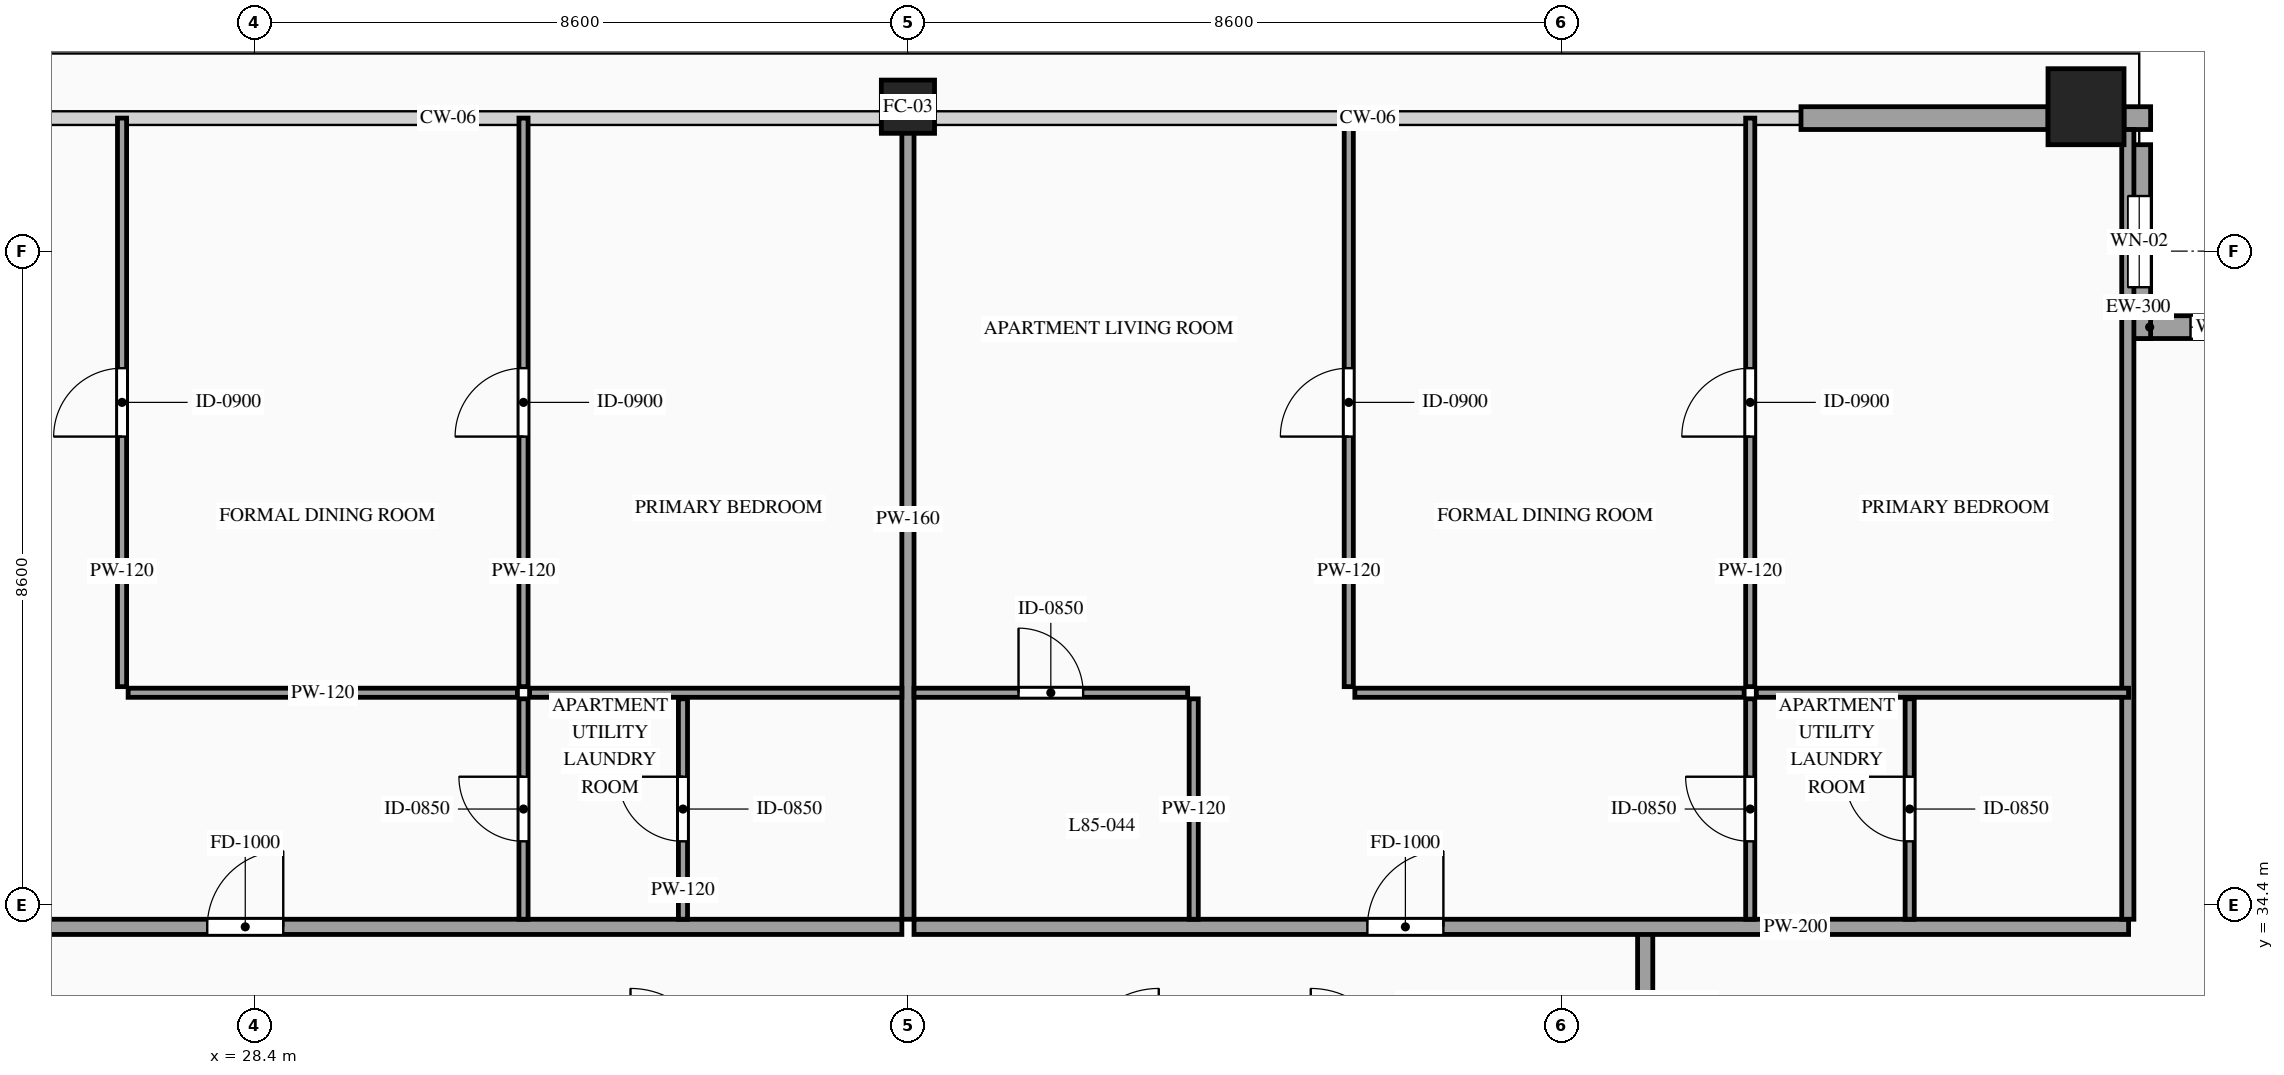
"""IFC4 building model, lengths in metres.
Left out: names, types, materials, properties, quantities, classifications, styles, units other than length and angle.
Written with IfcOpenShell. Run it as: python <this file> out.ifc"""

import sys

from ifc_helpers import new_model, si_unit, direction, frame, frame_2d, origin, origin_2d, place, context, subcontext, project, spatial, rectangle, hollow_rectangle, extrude, source, transform, mapped, element, fill, save


model = new_model("IFC4")
c1 = context("Model", 3, precision=1e-05, world=origin(), true_north=direction((0.0, 1.0)))
c2 = subcontext(c1, "Body", "Model", "MODEL_VIEW")
j1 = project(units=[si_unit("LENGTHUNIT", "METRE"), si_unit("PLANEANGLEUNIT", "RADIAN")], contexts=[c1])
p1 = place(None, origin())
s1 = spatial("IfcSite", under=j1, at=p1, CompositionType="ELEMENT")
p2 = place(p1, origin())
s2 = spatial("IfcBuilding", under=s1, at=p2, CompositionType="ELEMENT")
p3 = place(p2, frame((0.0, 0.0, 318.2)))
s3 = spatial("IfcBuildingStorey", under=s2, at=p3, CompositionType="ELEMENT", Elevation=318.2)
m1 = source(origin(), c2, "Body", "SweptSolid", [
    extrude(hollow_rectangle(XDim=0.7, YDim=0.7, WallThickness=0.032, at=origin_2d()), origin(), (0.0, 0.0, 1.0), 3.5),
])
p4 = place(p3, frame((37.0, 44.9, 0.0), z_axis=(0.0, 0.0, 1.0), x_axis=(1.0, 0.0, 0.0)))
e1 = element("IfcColumn", 1, at=p4, inside=s3, PredefinedType="COLUMN", context=c2, shape_type="MappedRepresentation", body=[
    mapped(m1, transform((0.0, 0.0, 0.0), scale=1.0)),
])
m2 = source(origin(), c2, "Body", "SweptSolid", [
    extrude(hollow_rectangle(XDim=1.0, YDim=1.0, WallThickness=0.048, at=origin_2d()), origin(), (0.0, 0.0, 1.0), 3.5),
])
p5 = place(p3, frame((52.5, 44.9, 0.0), z_axis=(0.0, 0.0, 1.0), x_axis=(1.0, 0.0, 0.0)))
e2 = element("IfcColumn", 2, at=p5, inside=s3, PredefinedType="COLUMN", context=c2, shape_type="MappedRepresentation", body=[
    mapped(m2, transform((0.0, 0.0, 0.0), scale=1.0)),
])
p6 = place(p3, frame((55.6, 42.0, 0.0), z_axis=(0.0, 0.0, 1.0), x_axis=(-1.0, 0.0, 0.0)))
e3 = element("IfcWall", 3, at=p6, inside=s3, PredefinedType="SOLIDWALL", context=c2, shape_type="SweptSolid", body=[
    extrude(rectangle(XDim=2.55, YDim=0.3, at=frame_2d((1.275, 0.0))), origin(), (0.0, 0.0, 1.0), 3.28),
])
p7 = place(p6, frame((0.825, 0.0, 0.85)))
e4 = element("IfcOpeningElement", 4, at=p7, cuts=e3, PredefinedType="OPENING", context=c2, shape_type="SweptSolid", body=[
    extrude(rectangle(XDim=0.9, YDim=1.5, at=frame_2d((0.45, 0.75))), frame((0.0, 0.165, 0.0), z_axis=(0.0, -1.0, 0.0), x_axis=(1.0, 0.0, 0.0)), (0.0, 0.0, 1.0), 0.33),
])
p8 = place(p3, frame((53.2, 41.85, 0.0), z_axis=(0.0, 0.0, 1.0), x_axis=(0.0, 1.0, 0.0)))
e5 = element("IfcWall", 5, at=p8, inside=s3, PredefinedType="SOLIDWALL", context=c2, shape_type="SweptSolid", body=[
    extrude(rectangle(XDim=2.55, YDim=0.3, at=frame_2d((1.275, 0.0))), origin(), (0.0, 0.0, 1.0), 3.28),
])
p9 = place(p8, frame((0.675, 0.0, 0.85)))
e6 = element("IfcOpeningElement", 6, at=p9, cuts=e5, PredefinedType="OPENING", context=c2, shape_type="SweptSolid", body=[
    extrude(rectangle(XDim=1.2, YDim=2.1, at=frame_2d((0.6, 1.05))), frame((0.0, 0.165, 0.0), z_axis=(0.0, -1.0, 0.0), x_axis=(1.0, 0.0, 0.0)), (0.0, 0.0, 1.0), 0.33),
])
m3 = source(origin(), c2, "Body", "SweptSolid", [
    extrude(rectangle(XDim=0.35, YDim=0.3, at=frame_2d((0.175, 0.0))), origin(), (0.0, 0.0, 1.0), 3.28),
])
p10 = place(p3, frame((53.0, 44.75, 0.0), z_axis=(0.0, 0.0, 1.0), x_axis=(1.0, 0.0, 0.0)))
e7 = element("IfcWall", 7, at=p10, inside=s3, PredefinedType="SOLIDWALL", context=c2, shape_type="MappedRepresentation", body=[
    mapped(m3, transform((0.0, 0.0, 0.0), scale=1.0)),
])
m4 = source(origin(), c2, "Body", "SweptSolid", [
    extrude(rectangle(XDim=3.25, YDim=0.3, at=frame_2d((1.625, 0.0))), origin(), (0.0, 0.0, 1.0), 2.885),
])
p11 = place(p3, frame((48.75, 44.75, 0.0), z_axis=(0.0, 0.0, 1.0), x_axis=(1.0, 0.0, 0.0)))
e8 = element("IfcWall", 8, at=p11, inside=s3, PredefinedType="SOLIDWALL", context=c2, shape_type="MappedRepresentation", body=[
    mapped(m4, transform((0.0, 0.0, 0.0), scale=1.0)),
])
m5 = source(origin(), c2, "Body", "SweptSolid", [
    extrude(rectangle(XDim=1.7, YDim=0.2, at=frame_2d((0.85, 0.0))), origin(), (0.0, 0.0, 1.0), 3.28),
])
p12 = place(p3, frame((46.7, 32.35, 0.0), z_axis=(0.0, 0.0, 1.0), x_axis=(0.0, 1.0, 0.0)))
e9 = element("IfcWall", 9, at=p12, inside=s3, PredefinedType="PARTITIONING", context=c2, shape_type="MappedRepresentation", body=[
    mapped(m5, transform((0.0, 0.0, 0.0), scale=1.0)),
])
p13 = place(p3, frame((20.94, 34.11, 0.0), z_axis=(0.0, 0.0, 1.0), x_axis=(1.0, 0.0, 0.0)))
e10 = element("IfcWall", 10, at=p13, inside=s3, PredefinedType="PARTITIONING", context=c2, shape_type="SweptSolid", body=[
    extrude(rectangle(XDim=15.98, YDim=0.2, at=frame_2d((7.99, 0.0))), origin(), (0.0, 0.0, 1.0), 3.28),
])
p14 = place(p13, frame((6.841, 0.0, 0.0)))
e11 = element("IfcOpeningElement", 11, at=p14, cuts=e10, PredefinedType="OPENING", context=c2, shape_type="SweptSolid", body=[
    extrude(rectangle(XDim=1.0, YDim=2.2, at=frame_2d((0.5, 1.1))), frame((0.0, 0.115, 0.0), z_axis=(0.0, -1.0, 0.0), x_axis=(1.0, 0.0, 0.0)), (0.0, 0.0, 1.0), 0.23),
])
m6 = source(origin(), c2, "Body", "SweptSolid", [
    extrude(rectangle(XDim=10.54, YDim=0.16, at=frame_2d((5.27, 0.0))), origin(), (0.0, 0.0, 1.0), 2.787),
])
p15 = place(p3, frame((37.0, 34.21, 0.0), z_axis=(0.0, 0.0, 1.0), x_axis=(0.0, 1.0, 0.0)))
e12 = element("IfcWall", 12, at=p15, inside=s3, PredefinedType="PARTITIONING", context=c2, shape_type="MappedRepresentation", body=[
    mapped(m6, transform((0.0, 0.0, 0.0), scale=1.0)),
])
p16 = place(p3, frame((34.04, 34.21, 0.0), z_axis=(0.0, 0.0, 1.0), x_axis=(0.0, 1.0, 0.0)))
e13 = element("IfcWall", 13, at=p16, inside=s3, PredefinedType="PARTITIONING", context=c2, shape_type="SweptSolid", body=[
    extrude(rectangle(XDim=2.9, YDim=0.12, at=frame_2d((1.45, 0.0))), origin(), (0.0, 0.0, 1.0), 3.28),
])
p17 = place(p16, frame((1.025, 0.0, 0.0)))
e14 = element("IfcOpeningElement", 14, at=p17, cuts=e13, PredefinedType="OPENING", context=c2, shape_type="SweptSolid", body=[
    extrude(rectangle(XDim=0.85, YDim=2.1, at=frame_2d((0.425, 1.05))), frame((0.0, 0.075, 0.0), z_axis=(0.0, -1.0, 0.0), x_axis=(1.0, 0.0, 0.0)), (0.0, 0.0, 1.0), 0.15),
])
m7 = source(origin(), c2, "Body", "SweptSolid", [
    extrude(rectangle(XDim=4.898, YDim=0.12, at=frame_2d((2.449, 0.0))), origin(), (0.0, 0.0, 1.0), 3.28),
])
p18 = place(p3, frame((32.022, 37.19, 0.0), z_axis=(0.0, 0.0, 1.0), x_axis=(1.0, 0.0, 0.0)))
e15 = element("IfcWall", 15, at=p18, inside=s3, PredefinedType="PARTITIONING", context=c2, shape_type="MappedRepresentation", body=[
    mapped(m7, transform((0.0, 0.0, 0.0), scale=1.0)),
])
p19 = place(p3, frame((31.942, 37.27, 0.0), z_axis=(0.0, 0.0, 1.0), x_axis=(0.0, 1.0, 0.0)))
e16 = element("IfcWall", 16, at=p19, inside=s3, PredefinedType="PARTITIONING", context=c2, shape_type="SweptSolid", body=[
    extrude(rectangle(XDim=7.48, YDim=0.12, at=frame_2d((3.74, 0.0))), origin(), (0.0, 0.0, 1.0), 3.28),
])
p20 = place(p19, frame((3.29, 0.0, 0.0)))
e17 = element("IfcOpeningElement", 17, at=p20, cuts=e16, PredefinedType="OPENING", context=c2, shape_type="SweptSolid", body=[
    extrude(rectangle(XDim=0.9, YDim=2.15, at=frame_2d((0.45, 1.075))), frame((0.0, 0.075, 0.0), z_axis=(0.0, -1.0, 0.0), x_axis=(1.0, 0.0, 0.0)), (0.0, 0.0, 1.0), 0.15),
])
p21 = place(p3, frame((31.942, 34.21, 0.0), z_axis=(0.0, 0.0, 1.0), x_axis=(0.0, 1.0, 0.0)))
e18 = element("IfcWall", 18, at=p21, inside=s3, PredefinedType="PARTITIONING", context=c2, shape_type="SweptSolid", body=[
    extrude(rectangle(XDim=2.9, YDim=0.12, at=frame_2d((1.45, 0.0))), origin(), (0.0, 0.0, 1.0), 3.28),
])
p22 = place(p21, frame((1.025, 0.0, 0.0)))
e19 = element("IfcOpeningElement", 19, at=p22, cuts=e18, PredefinedType="OPENING", context=c2, shape_type="SweptSolid", body=[
    extrude(rectangle(XDim=0.85, YDim=2.1, at=frame_2d((0.425, 1.05))), frame((0.0, 0.075, 0.0), z_axis=(0.0, -1.0, 0.0), x_axis=(1.0, 0.0, 0.0)), (0.0, 0.0, 1.0), 0.15),
])
m8 = source(origin(), c2, "Body", "SweptSolid", [
    extrude(rectangle(XDim=5.122, YDim=0.12, at=frame_2d((2.561, 0.0))), origin(), (0.0, 0.0, 1.0), 3.28),
])
p23 = place(p3, frame((26.74, 37.19, 0.0), z_axis=(0.0, 0.0, 1.0), x_axis=(1.0, 0.0, 0.0)))
e20 = element("IfcWall", 20, at=p23, inside=s3, PredefinedType="PARTITIONING", context=c2, shape_type="MappedRepresentation", body=[
    mapped(m8, transform((0.0, 0.0, 0.0), scale=1.0)),
])
p24 = place(p3, frame((26.66, 37.27, 0.0), z_axis=(0.0, 0.0, 1.0), x_axis=(0.0, 1.0, 0.0)))
e21 = element("IfcWall", 21, at=p24, inside=s3, PredefinedType="PARTITIONING", context=c2, shape_type="SweptSolid", body=[
    extrude(rectangle(XDim=7.48, YDim=0.12, at=frame_2d((3.74, 0.0))), origin(), (0.0, 0.0, 1.0), 3.28),
])
p25 = place(p24, frame((3.29, 0.0, 0.0)))
e22 = element("IfcOpeningElement", 22, at=p25, cuts=e21, PredefinedType="OPENING", context=c2, shape_type="SweptSolid", body=[
    extrude(rectangle(XDim=0.9, YDim=2.15, at=frame_2d((0.45, 1.075))), frame((0.0, 0.075, 0.0), z_axis=(0.0, -1.0, 0.0), x_axis=(1.0, 0.0, 0.0)), (0.0, 0.0, 1.0), 0.15),
])
p26 = place(p3, frame((37.08, 34.11, 0.0), z_axis=(0.0, 0.0, 1.0), x_axis=(1.0, 0.0, 0.0)))
e23 = element("IfcWall", 23, at=p26, inside=s3, PredefinedType="PARTITIONING", context=c2, shape_type="SweptSolid", body=[
    extrude(rectangle(XDim=15.98, YDim=0.2, at=frame_2d((7.99, 0.0))), origin(), (0.0, 0.0, 1.0), 3.28),
])
p27 = place(p26, frame((5.965, 0.0, 0.0)))
e24 = element("IfcOpeningElement", 24, at=p27, cuts=e23, PredefinedType="OPENING", context=c2, shape_type="SweptSolid", body=[
    extrude(rectangle(XDim=1.0, YDim=2.2, at=frame_2d((0.5, 1.1))), frame((0.0, 0.115, 0.0), z_axis=(0.0, -1.0, 0.0), x_axis=(1.0, 0.0, 0.0)), (0.0, 0.0, 1.0), 0.23),
])
m9 = source(origin(), c2, "Body", "SweptSolid", [
    extrude(rectangle(XDim=10.39, YDim=0.16, at=frame_2d((5.195, 0.0))), origin(), (0.0, 0.0, 1.0), 3.28),
])
p28 = place(p3, frame((53.05, 34.21, 0.0), z_axis=(0.0, 0.0, 1.0), x_axis=(0.0, 1.0, 0.0)))
e25 = element("IfcWall", 25, at=p28, inside=s3, PredefinedType="PARTITIONING", context=c2, shape_type="MappedRepresentation", body=[
    mapped(m9, transform((0.0, 0.0, 0.0), scale=1.0)),
])
p29 = place(p3, frame((37.08, 37.19, 0.0), z_axis=(0.0, 0.0, 1.0), x_axis=(1.0, 0.0, 0.0)))
e26 = element("IfcWall", 26, at=p29, inside=s3, PredefinedType="PARTITIONING", context=c2, shape_type="SweptSolid", body=[
    extrude(rectangle(XDim=3.6, YDim=0.12, at=frame_2d((1.8, 0.0))), origin(), (0.0, 0.0, 1.0), 3.28),
])
p30 = place(p29, frame((1.375, 0.0, 0.0)))
e27 = element("IfcOpeningElement", 27, at=p30, cuts=e26, PredefinedType="OPENING", context=c2, shape_type="SweptSolid", body=[
    extrude(rectangle(XDim=0.85, YDim=2.1, at=frame_2d((0.425, 1.05))), frame((0.0, 0.075, 0.0), z_axis=(0.0, -1.0, 0.0), x_axis=(1.0, 0.0, 0.0)), (0.0, 0.0, 1.0), 0.15),
])
m10 = source(origin(), c2, "Body", "SweptSolid", [
    extrude(rectangle(XDim=2.9, YDim=0.12, at=frame_2d((1.45, 0.0))), origin(), (0.0, 0.0, 1.0), 3.28),
])
p31 = place(p3, frame((40.76, 34.21, 0.0), z_axis=(0.0, 0.0, 1.0), x_axis=(0.0, 1.0, 0.0)))
e28 = element("IfcWall", 28, at=p31, inside=s3, PredefinedType="PARTITIONING", context=c2, shape_type="MappedRepresentation", body=[
    mapped(m10, transform((0.0, 0.0, 0.0), scale=1.0)),
])
p32 = place(p3, frame((50.18, 34.21, 0.0), z_axis=(0.0, 0.0, 1.0), x_axis=(0.0, 1.0, 0.0)))
e29 = element("IfcWall", 29, at=p32, inside=s3, PredefinedType="PARTITIONING", context=c2, shape_type="SweptSolid", body=[
    extrude(rectangle(XDim=2.9, YDim=0.12, at=frame_2d((1.45, 0.0))), origin(), (0.0, 0.0, 1.0), 2.825),
])
p33 = place(p32, frame((1.025, 0.0, 0.0)))
e30 = element("IfcOpeningElement", 30, at=p33, cuts=e29, PredefinedType="OPENING", context=c2, shape_type="SweptSolid", body=[
    extrude(rectangle(XDim=0.85, YDim=2.1, at=frame_2d((0.425, 1.05))), frame((0.0, 0.075, 0.0), z_axis=(0.0, -1.0, 0.0), x_axis=(1.0, 0.0, 0.0)), (0.0, 0.0, 1.0), 0.15),
])
p34 = place(p3, frame((48.162, 37.19, 0.0), z_axis=(0.0, 0.0, 1.0), x_axis=(1.0, 0.0, 0.0)))
e31 = element("IfcWall", 31, at=p34, inside=s3, PredefinedType="PARTITIONING", context=c2, shape_type="MappedRepresentation", body=[
    mapped(m7, transform((0.0, 0.0, 0.0), scale=1.0)),
])
p35 = place(p3, frame((48.082, 37.27, 0.0), z_axis=(0.0, 0.0, 1.0), x_axis=(0.0, 1.0, 0.0)))
e32 = element("IfcWall", 32, at=p35, inside=s3, PredefinedType="PARTITIONING", context=c2, shape_type="SweptSolid", body=[
    extrude(rectangle(XDim=7.48, YDim=0.12, at=frame_2d((3.74, 0.0))), origin(), (0.0, 0.0, 1.0), 3.28),
])
p36 = place(p35, frame((3.29, 0.0, 0.0)))
e33 = element("IfcOpeningElement", 33, at=p36, cuts=e32, PredefinedType="OPENING", context=c2, shape_type="SweptSolid", body=[
    extrude(rectangle(XDim=0.9, YDim=2.15, at=frame_2d((0.45, 1.075))), frame((0.0, 0.075, 0.0), z_axis=(0.0, -1.0, 0.0), x_axis=(1.0, 0.0, 0.0)), (0.0, 0.0, 1.0), 0.15),
])
p37 = place(p3, frame((48.082, 34.21, 0.0), z_axis=(0.0, 0.0, 1.0), x_axis=(0.0, 1.0, 0.0)))
e34 = element("IfcWall", 34, at=p37, inside=s3, PredefinedType="PARTITIONING", context=c2, shape_type="SweptSolid", body=[
    extrude(rectangle(XDim=2.9, YDim=0.12, at=frame_2d((1.45, 0.0))), origin(), (0.0, 0.0, 1.0), 3.28),
])
p38 = place(p37, frame((1.025, 0.0, 0.0)))
e35 = element("IfcOpeningElement", 35, at=p38, cuts=e34, PredefinedType="OPENING", context=c2, shape_type="SweptSolid", body=[
    extrude(rectangle(XDim=0.85, YDim=2.1, at=frame_2d((0.425, 1.05))), frame((0.0, 0.075, 0.0), z_axis=(0.0, -1.0, 0.0), x_axis=(1.0, 0.0, 0.0)), (0.0, 0.0, 1.0), 0.15),
])
p39 = place(p3, frame((42.88, 37.19, 0.0), z_axis=(0.0, 0.0, 1.0), x_axis=(1.0, 0.0, 0.0)))
e36 = element("IfcWall", 36, at=p39, inside=s3, PredefinedType="PARTITIONING", context=c2, shape_type="MappedRepresentation", body=[
    mapped(m8, transform((0.0, 0.0, 0.0), scale=1.0)),
])
p40 = place(p3, frame((42.8, 37.27, 0.0), z_axis=(0.0, 0.0, 1.0), x_axis=(0.0, 1.0, 0.0)))
e37 = element("IfcWall", 37, at=p40, inside=s3, PredefinedType="PARTITIONING", context=c2, shape_type="SweptSolid", body=[
    extrude(rectangle(XDim=7.48, YDim=0.12, at=frame_2d((3.74, 0.0))), origin(), (0.0, 0.0, 1.0), 3.28),
])
p41 = place(p40, frame((3.29, 0.0, 0.0)))
e38 = element("IfcOpeningElement", 38, at=p41, cuts=e37, PredefinedType="OPENING", context=c2, shape_type="SweptSolid", body=[
    extrude(rectangle(XDim=0.9, YDim=2.15, at=frame_2d((0.45, 1.075))), frame((0.0, 0.075, 0.0), z_axis=(0.0, -1.0, 0.0), x_axis=(1.0, 0.0, 0.0)), (0.0, 0.0, 1.0), 0.15),
])
m11 = source(origin(), c2, "Body", "SweptSolid", [
    extrude(rectangle(XDim=0.9, YDim=1.5, at=frame_2d((0.45, 0.75))), frame((0.0, 0.03, 0.0), z_axis=(0.0, -1.0, 0.0), x_axis=(1.0, 0.0, 0.0)), (0.0, 0.0, 1.0), 0.06),
])
p42 = place(p7, origin())
e39 = element("IfcWindow", 39, at=p42, inside=s3, PartitioningType="SINGLE_PANEL", PredefinedType="WINDOW", context=c2, shape_type="MappedRepresentation", body=[
    mapped(m11, transform((0.0, 0.0, 0.0), scale=1.0)),
])
fill(e4, e39)
m12 = source(origin(), c2, "Body", "SweptSolid", [
    extrude(rectangle(XDim=1.2, YDim=2.1, at=frame_2d((0.6, 1.05))), frame((0.0, 0.03, 0.0), z_axis=(0.0, -1.0, 0.0), x_axis=(1.0, 0.0, 0.0)), (0.0, 0.0, 1.0), 0.06),
])
p43 = place(p9, origin())
e40 = element("IfcWindow", 40, at=p43, inside=s3, PartitioningType="SINGLE_PANEL", PredefinedType="WINDOW", context=c2, shape_type="MappedRepresentation", body=[
    mapped(m12, transform((0.0, 0.0, 0.0), scale=1.0)),
])
fill(e6, e40)
m13 = source(origin(), c2, "Body", "SweptSolid", [
    extrude(rectangle(XDim=1.0, YDim=2.2, at=frame_2d((0.5, 1.1))), frame((0.0, 0.025, 0.0), z_axis=(0.0, -1.0, 0.0), x_axis=(1.0, 0.0, 0.0)), (0.0, 0.0, 1.0), 0.05),
])
p44 = place(p14, origin())
e41 = element("IfcDoor", 41, at=p44, inside=s3, OperationType="SINGLE_SWING_RIGHT", PredefinedType="DOOR", context=c2, shape_type="MappedRepresentation", body=[
    mapped(m13, transform((0.0, 0.0, 0.0), scale=1.0)),
])
fill(e11, e41)
m14 = source(origin(), c2, "Body", "SweptSolid", [
    extrude(rectangle(XDim=0.85, YDim=2.1, at=frame_2d((0.425, 1.05))), frame((0.0, 0.025, 0.0), z_axis=(0.0, -1.0, 0.0), x_axis=(1.0, 0.0, 0.0)), (0.0, 0.0, 1.0), 0.05),
])
p45 = place(p17, origin())
e42 = element("IfcDoor", 42, at=p45, inside=s3, OperationType="SINGLE_SWING_RIGHT", PredefinedType="DOOR", context=c2, shape_type="MappedRepresentation", body=[
    mapped(m14, transform((0.0, 0.0, 0.0), scale=1.0)),
])
fill(e14, e42)
m15 = source(origin(), c2, "Body", "SweptSolid", [
    extrude(rectangle(XDim=0.9, YDim=2.15, at=frame_2d((0.45, 1.075))), frame((0.0, 0.025, 0.0), z_axis=(0.0, -1.0, 0.0), x_axis=(1.0, 0.0, 0.0)), (0.0, 0.0, 1.0), 0.05),
])
p46 = place(p20, origin())
e43 = element("IfcDoor", 43, at=p46, inside=s3, OperationType="SINGLE_SWING_LEFT", PredefinedType="DOOR", context=c2, shape_type="MappedRepresentation", body=[
    mapped(m15, transform((0.0, 0.0, 0.0), scale=1.0)),
])
fill(e17, e43)
p47 = place(p22, origin())
e44 = element("IfcDoor", 44, at=p47, inside=s3, OperationType="SINGLE_SWING_RIGHT", PredefinedType="DOOR", context=c2, shape_type="MappedRepresentation", body=[
    mapped(m14, transform((0.0, 0.0, 0.0), scale=1.0)),
])
fill(e19, e44)
p48 = place(p25, origin())
e45 = element("IfcDoor", 45, at=p48, inside=s3, OperationType="SINGLE_SWING_LEFT", PredefinedType="DOOR", context=c2, shape_type="MappedRepresentation", body=[
    mapped(m15, transform((0.0, 0.0, 0.0), scale=1.0)),
])
fill(e22, e45)
p49 = place(p27, origin())
e46 = element("IfcDoor", 46, at=p49, inside=s3, OperationType="SINGLE_SWING_RIGHT", PredefinedType="DOOR", context=c2, shape_type="MappedRepresentation", body=[
    mapped(m13, transform((0.0, 0.0, 0.0), scale=1.0)),
])
fill(e24, e46)
p50 = place(p30, origin())
e47 = element("IfcDoor", 47, at=p50, inside=s3, OperationType="SINGLE_SWING_LEFT", PredefinedType="DOOR", context=c2, shape_type="MappedRepresentation", body=[
    mapped(m14, transform((0.0, 0.0, 0.0), scale=1.0)),
])
fill(e27, e47)
p51 = place(p33, origin())
e48 = element("IfcDoor", 48, at=p51, inside=s3, OperationType="SINGLE_SWING_RIGHT", PredefinedType="DOOR", context=c2, shape_type="MappedRepresentation", body=[
    mapped(m14, transform((0.0, 0.0, 0.0), scale=1.0)),
])
fill(e30, e48)
p52 = place(p36, origin())
e49 = element("IfcDoor", 49, at=p52, inside=s3, OperationType="SINGLE_SWING_LEFT", PredefinedType="DOOR", context=c2, shape_type="MappedRepresentation", body=[
    mapped(m15, transform((0.0, 0.0, 0.0), scale=1.0)),
])
fill(e33, e49)
p53 = place(p38, origin())
e50 = element("IfcDoor", 50, at=p53, inside=s3, OperationType="SINGLE_SWING_RIGHT", PredefinedType="DOOR", context=c2, shape_type="MappedRepresentation", body=[
    mapped(m14, transform((0.0, 0.0, 0.0), scale=1.0)),
])
fill(e35, e50)
p54 = place(p41, origin())
e51 = element("IfcDoor", 51, at=p54, inside=s3, OperationType="SINGLE_SWING_LEFT", PredefinedType="DOOR", context=c2, shape_type="MappedRepresentation", body=[
    mapped(m15, transform((0.0, 0.0, 0.0), scale=1.0)),
])
fill(e38, e51)
save(model, sys.argv[1])
